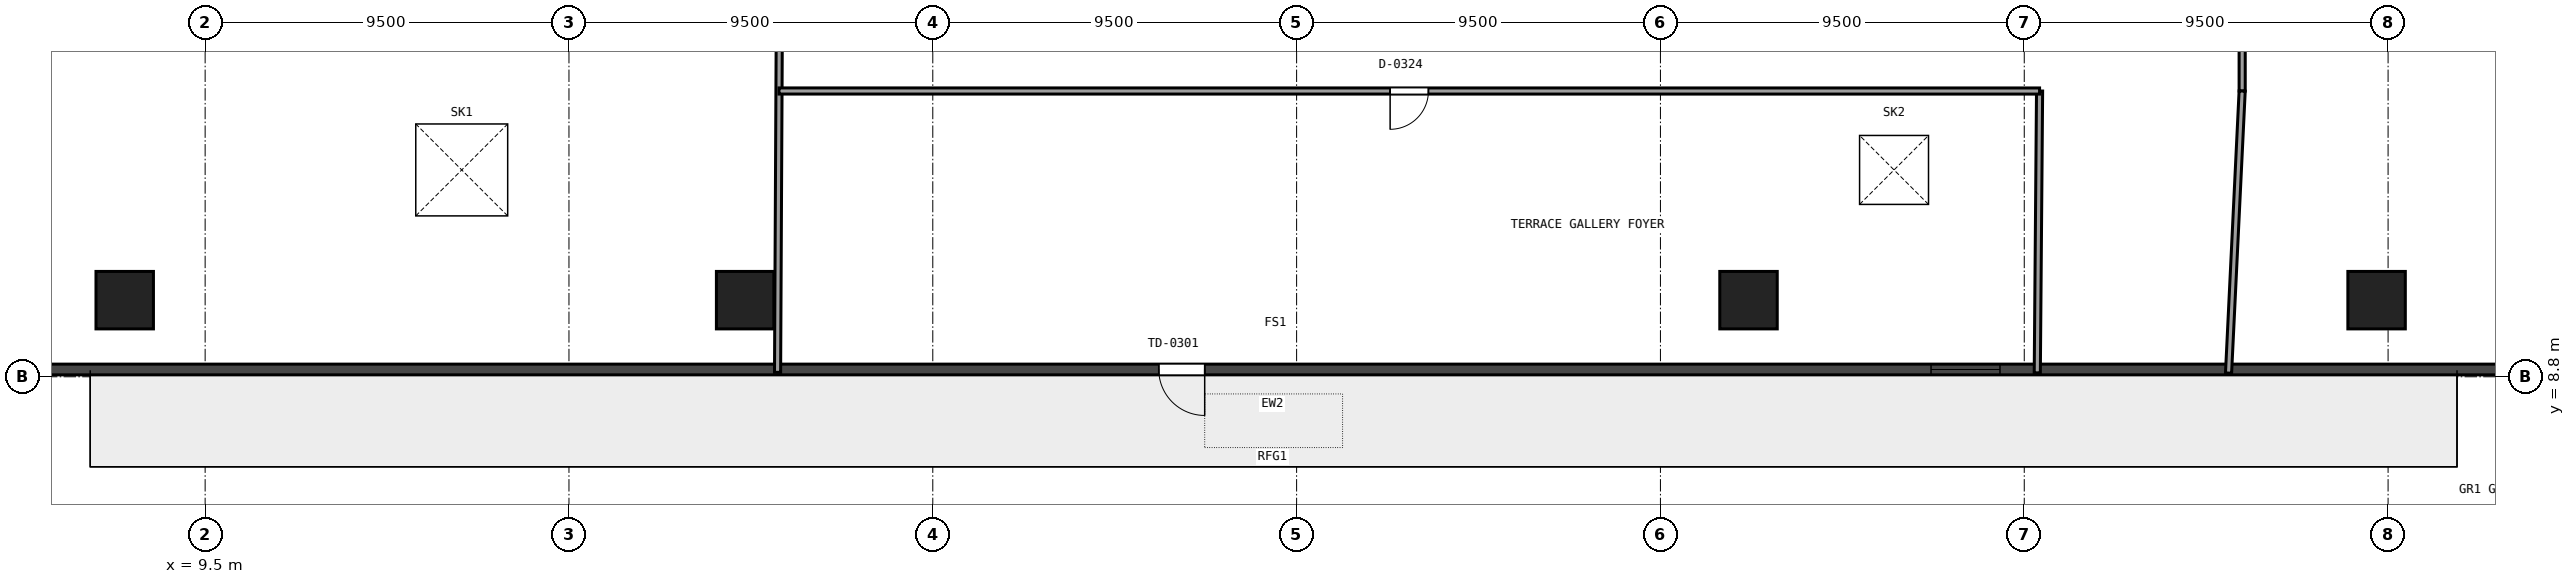
"""IFC4 building model, lengths in metres.
Left out: names, types, materials, properties, quantities, classifications, styles, units other than length and angle.
Written with IfcOpenShell. Run it as: python <this file> out.ifc"""

import sys

from ifc_helpers import new_model, si_unit, direction, frame, frame_2d, origin, origin_2d, place, context, subcontext, project, spatial, rectangle, extrude, element, fill, save


model = new_model("IFC4")
c1 = context("Model", 3, precision=1e-05, world=origin(), true_north=direction((0.0, 1.0)))
c2 = subcontext(c1, "Body", "Model", "MODEL_VIEW")
j1 = project(units=[si_unit("LENGTHUNIT", "METRE"), si_unit("PLANEANGLEUNIT", "RADIAN")], contexts=[c1])
p1 = place(None, origin())
s1 = spatial("IfcSite", under=j1, at=p1, CompositionType="ELEMENT")
p2 = place(p1, origin())
s2 = spatial("IfcBuilding", under=s1, at=p2, CompositionType="ELEMENT")
p3 = place(p2, frame((0.0, 0.0, 16.2)))
s3 = spatial("IfcBuildingStorey", under=s2, at=p3, CompositionType="ELEMENT", Elevation=16.2)
for number, where, z_axis, x_axis in (
    (1, (7.4, 10.8, 0.0), (0.0, 0.0, 1.0), (1.0, 0.0, 0.0)),
    (2, (23.6, 10.8, 0.0), (0.0, 0.0, 1.0), (1.0, 0.0, 0.0)),
    (3, (49.8, 10.8, 0.0), (0.0, 0.0, 1.0), (1.0, 0.0, 0.0)),
    (4, (66.2, 10.8, 0.0), (0.0, 0.0, 1.0), (1.0, 0.0, 0.0)),
):
    element("IfcColumn", number, at=place(p3, frame(where, z_axis=z_axis, x_axis=x_axis)), inside=s3, PredefinedType="COLUMN", context=c2, shape_type="SweptSolid", body=[
        extrude(rectangle(XDim=1.5, YDim=1.5, at=origin_2d()), origin(), (0.0, 0.0, 1.0), 4.98),
    ])
p4 = place(p3, frame((69.66, 8.99, 0.0), z_axis=(0.0, 0.0, 1.0), x_axis=(-1.0, 0.0, 0.0)))
e5 = element("IfcWall", 5, at=p4, inside=s3, PredefinedType="SOLIDWALL", context=c2, shape_type="SweptSolid", body=[
    extrude(rectangle(XDim=64.52, YDim=0.28, at=frame_2d((32.26, 0.0))), origin(), (0.0, 0.0, 1.0), 4.98),
])
p5 = place(p4, frame((13.294, 0.0, 0.95)))
e6 = element("IfcOpeningElement", 6, at=p5, cuts=e5, PredefinedType="OPENING", context=c2, shape_type="SweptSolid", body=[
    extrude(rectangle(XDim=1.8, YDim=2.3, at=frame_2d((0.9, 1.15))), frame((0.0, 0.15, 0.0), z_axis=(0.0, -1.0, 0.0), x_axis=(1.0, 0.0, 0.0)), (0.0, 0.0, 1.0), 0.3),
])
p6 = place(p4, frame((34.06, 0.0, 0.0)))
e7 = element("IfcOpeningElement", 7, at=p6, cuts=e5, PredefinedType="OPENING", context=c2, shape_type="SweptSolid", body=[
    extrude(rectangle(XDim=1.2, YDim=2.2, at=frame_2d((0.6, 1.1))), frame((0.0, 0.15, 0.0), z_axis=(0.0, -1.0, 0.0), x_axis=(1.0, 0.0, 0.0)), (0.0, 0.0, 1.0), 0.3),
])
p7 = place(p3, frame((24.447, 8.915, 0.0), z_axis=(0.0, 0.0, 1.0), x_axis=(0.005029419566, 0.999987352389, 0.0)))
e8 = element("IfcWall", 8, at=p7, inside=s3, PredefinedType="PARTITIONING", context=c2, shape_type="SweptSolid", body=[
    extrude(rectangle(XDim=15.485, YDim=0.16, at=frame_2d((7.743, 0.0))), origin(), (0.0, 0.0, 1.0), 4.065),
])
p8 = place(p7, frame((8.729, 0.0, 0.0)))
e9 = element("IfcOpeningElement", 9, at=p8, cuts=e8, PredefinedType="OPENING", context=c2, shape_type="SweptSolid", body=[
    extrude(rectangle(XDim=1.8, YDim=2.25, at=frame_2d((0.9, 1.125))), frame((0.0, 0.09, 0.0), z_axis=(0.0, -1.0, 0.0), x_axis=(1.0, 0.0, 0.0)), (0.0, 0.0, 1.0), 0.18),
])
p9 = place(p3, frame((57.34, 8.902, 0.0), z_axis=(0.0, 0.0, 1.0), x_axis=(0.008129003417, 0.999966959106, 0.0)))
e10 = element("IfcWall", 10, at=p9, inside=s3, PredefinedType="PARTITIONING", context=c2, shape_type="SweptSolid", body=[
    extrude(rectangle(XDim=7.358, YDim=0.16, at=frame_2d((3.679, 0.0))), origin(), (0.0, 0.0, 1.0), 4.121),
])
p10 = place(p3, frame((57.4, 16.26, 0.0), z_axis=(0.0, 0.0, 1.0), x_axis=(-0.99999999956, 2.9668308e-05, 0.0)))
e11 = element("IfcWall", 11, at=p10, inside=s3, PredefinedType="PARTITIONING", context=c2, shape_type="SweptSolid", body=[
    extrude(rectangle(XDim=32.916, YDim=0.16, at=frame_2d((16.458, 0.0))), origin(), (0.0, 0.0, 1.0), 4.133),
])
p11 = place(p10, frame((15.958, 0.0, 0.0)))
e12 = element("IfcOpeningElement", 12, at=p11, cuts=e11, PredefinedType="OPENING", context=c2, shape_type="SweptSolid", body=[
    extrude(rectangle(XDim=1.0, YDim=2.15, at=frame_2d((0.5, 1.075))), frame((0.0, 0.09, 0.0), z_axis=(0.0, -1.0, 0.0), x_axis=(1.0, 0.0, 0.0)), (0.0, 0.0, 1.0), 0.18),
])
p12 = place(p3, frame((62.69, 20.69, 0.0), z_axis=(0.0, 0.0, 1.0), x_axis=(0.0, -1.0, 0.0)))
e13 = element("IfcWall", 13, at=p12, inside=s3, PredefinedType="PARTITIONING", context=c2, shape_type="SweptSolid", body=[
    extrude(rectangle(XDim=4.43, YDim=0.16, at=frame_2d((2.215, 0.0))), origin(), (0.0, 0.0, 1.0), 4.065),
])
p13 = place(p3, frame((62.69, 16.26, 0.0), z_axis=(0.0, 0.0, 1.0), x_axis=(-0.048280995583, -0.998833792713, 0.0)))
e14 = element("IfcWall", 14, at=p13, inside=s3, PredefinedType="PARTITIONING", context=c2, shape_type="SweptSolid", body=[
    extrude(rectangle(XDim=7.373, YDim=0.16, at=frame_2d((3.686, 0.0))), origin(), (0.0, 0.0, 1.0), 4.121),
])
p14 = place(p5, origin())
e15 = element("IfcWindow", 15, at=p14, inside=s3, PartitioningType="SINGLE_PANEL", PredefinedType="WINDOW", context=c2, shape_type="SweptSolid", body=[
    extrude(rectangle(XDim=1.8, YDim=2.3, at=frame_2d((0.9, 1.15))), frame((0.0, 0.03, 0.0), z_axis=(0.0, -1.0, 0.0), x_axis=(1.0, 0.0, 0.0)), (0.0, 0.0, 1.0), 0.06),
])
fill(e6, e15)
p15 = place(p6, origin())
e16 = element("IfcDoor", 16, at=p15, inside=s3, OperationType="SINGLE_SWING_LEFT", PredefinedType="DOOR", context=c2, shape_type="SweptSolid", body=[
    extrude(rectangle(XDim=1.2, YDim=2.2, at=frame_2d((0.6, 1.1))), frame((0.0, 0.025, 0.0), z_axis=(0.0, -1.0, 0.0), x_axis=(1.0, 0.0, 0.0)), (0.0, 0.0, 1.0), 0.05),
])
fill(e7, e16)
p16 = place(p3, frame((0.0, 0.0, -0.35)))
p17 = place(p16, frame((16.2, 14.2, 0.0)))
p18 = place(p17, frame((0.0, 0.0, 0.3)))
e17 = element("IfcWindow", 17, at=p18, inside=s3, PartitioningType="SINGLE_PANEL", PredefinedType="SKYLIGHT", context=c2, shape_type="SweptSolid", body=[
    extrude(rectangle(XDim=2.4, YDim=2.4, at=origin_2d()), origin(), (0.0, 0.0, 1.0), 0.05),
])
p19 = place(p16, frame((53.6, 14.2, 0.0)))
p20 = place(p19, frame((0.0, 0.0, 0.3)))
e18 = element("IfcWindow", 18, at=p20, inside=s3, PartitioningType="SINGLE_PANEL", PredefinedType="SKYLIGHT", context=c2, shape_type="SweptSolid", body=[
    extrude(rectangle(XDim=1.8, YDim=1.8, at=origin_2d()), origin(), (0.0, 0.0, 1.0), 0.05),
])
p21 = place(p11, origin())
e19 = element("IfcDoor", 19, at=p21, inside=s3, OperationType="SINGLE_SWING_RIGHT", PredefinedType="DOOR", context=c2, shape_type="SweptSolid", body=[
    extrude(rectangle(XDim=1.0, YDim=2.15, at=frame_2d((0.5, 1.075))), frame((0.0, 0.025, 0.0), z_axis=(0.0, -1.0, 0.0), x_axis=(1.0, 0.0, 0.0)), (0.0, 0.0, 1.0), 0.05),
])
fill(e12, e19)
save(model, sys.argv[1])
